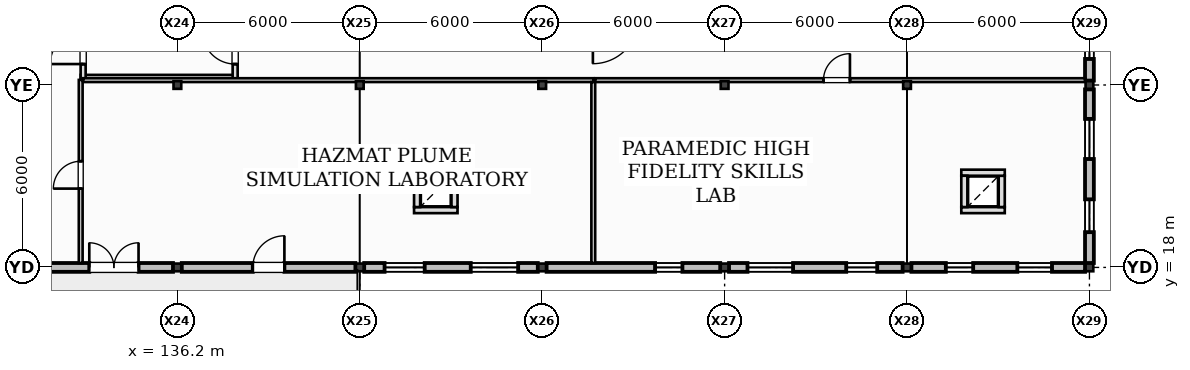
"""IFC4 building model, lengths in metres.
Left out: names, types, materials, properties, quantities, classifications, styles, units other than length and angle.
Written with IfcOpenShell. Run it as: python <this file> out.ifc"""

import sys

from ifc_helpers import new_model, si_unit, direction, frame, frame_2d, origin, origin_2d, place, context, subcontext, project, spatial, rectangle, i_section, extrude, element, fill, save


model = new_model("IFC4")
c1 = context("Model", 3, precision=1e-05, world=origin(), true_north=direction((0.0, 1.0)))
c2 = subcontext(c1, "Body", "Model", "MODEL_VIEW")
j1 = project(units=[si_unit("LENGTHUNIT", "METRE"), si_unit("PLANEANGLEUNIT", "RADIAN")], contexts=[c1])
p1 = place(None, origin())
s1 = spatial("IfcSite", under=j1, at=p1, CompositionType="ELEMENT")
p2 = place(p1, origin())
s2 = spatial("IfcBuilding", under=s1, at=p2, CompositionType="ELEMENT")
p3 = place(p2, frame((0.0, 0.0, 10.0)))
s3 = spatial("IfcBuildingStorey", under=s2, at=p3, CompositionType="ELEMENT", Elevation=10.0)
for number, where, z_axis, x_axis in (
    (1, (136.2, 18.0, 0.0), (0.0, 0.0, 1.0), (1.0, 0.0, 0.0)),
    (2, (136.2, 24.0, 0.0), (0.0, 0.0, 1.0), (1.0, 0.0, 0.0)),
    (3, (142.2, 18.0, 0.0), (0.0, 0.0, 1.0), (1.0, 0.0, 0.0)),
    (4, (142.2, 24.0, 0.0), (0.0, 0.0, 1.0), (1.0, 0.0, 0.0)),
    (5, (148.2, 18.0, 0.0), (0.0, 0.0, 1.0), (1.0, 0.0, 0.0)),
    (6, (148.2, 24.0, 0.0), (0.0, 0.0, 1.0), (1.0, 0.0, 0.0)),
    (7, (154.2, 18.0, 0.0), (0.0, 0.0, 1.0), (1.0, 0.0, 0.0)),
    (8, (154.2, 24.0, 0.0), (0.0, 0.0, 1.0), (1.0, 0.0, 0.0)),
    (9, (160.2, 18.0, 0.0), (0.0, 0.0, 1.0), (1.0, 0.0, 0.0)),
    (10, (160.2, 24.0, 0.0), (0.0, 0.0, 1.0), (1.0, 0.0, 0.0)),
    (11, (166.2, 18.0, 0.0), (0.0, 0.0, 1.0), (1.0, 0.0, 0.0)),
    (12, (166.2, 24.0, 0.0), (0.0, 0.0, 1.0), (1.0, 0.0, 0.0)),
):
    element("IfcColumn", number, at=place(p3, frame(where, z_axis=z_axis, x_axis=x_axis)), inside=s3, PredefinedType="COLUMN", context=c2, shape_type="SweptSolid", body=[
        extrude(i_section(OverallWidth=0.254, OverallDepth=0.253, WebThickness=0.009, FlangeThickness=0.014, at=origin_2d()), origin(), (0.0, 0.0, 1.0), 4.0),
    ])
p4 = place(p3, frame((130.345, 18.0, 0.0), z_axis=(0.0, 0.0, 1.0), x_axis=(1.0, 0.0, 0.0)))
e13 = element("IfcWall", 13, at=p4, inside=s3, PredefinedType="STANDARD", context=c2, shape_type="SweptSolid", body=[
    extrude(rectangle(XDim=5.71, YDim=0.29, at=frame_2d((2.855, 0.0))), origin(), (0.0, 0.0, 1.0), 4.0),
])
p5 = place(p4, frame((2.958, 0.0, 0.0)))
e14 = element("IfcOpeningElement", 14, at=p5, cuts=e13, PredefinedType="OPENING", context=c2, shape_type="SweptSolid", body=[
    extrude(rectangle(XDim=1.62, YDim=2.2, at=frame_2d((0.81, 1.1))), frame((0.0, 0.155, 0.0), z_axis=(0.0, -1.0, 0.0), x_axis=(1.0, 0.0, 0.0)), (0.0, 0.0, 1.0), 0.31),
])
p6 = place(p3, frame((136.345, 18.0, 0.0), z_axis=(0.0, 0.0, 1.0), x_axis=(1.0, 0.0, 0.0)))
e15 = element("IfcWall", 15, at=p6, inside=s3, PredefinedType="STANDARD", context=c2, shape_type="SweptSolid", body=[
    extrude(rectangle(XDim=5.71, YDim=0.29, at=frame_2d((2.855, 0.0))), origin(), (0.0, 0.0, 1.0), 4.0),
])
p7 = place(p6, frame((2.335, 0.0, 0.0)))
e16 = element("IfcOpeningElement", 16, at=p7, cuts=e15, PredefinedType="OPENING", context=c2, shape_type="SweptSolid", body=[
    extrude(rectangle(XDim=1.04, YDim=2.16, at=frame_2d((0.52, 1.08))), frame((0.0, 0.155, 0.0), z_axis=(0.0, -1.0, 0.0), x_axis=(1.0, 0.0, 0.0)), (0.0, 0.0, 1.0), 0.31),
])
p8 = place(p3, frame((142.345, 18.0, 0.0), z_axis=(0.0, 0.0, 1.0), x_axis=(1.0, 0.0, 0.0)))
e17 = element("IfcWall", 17, at=p8, inside=s3, PredefinedType="STANDARD", context=c2, shape_type="SweptSolid", body=[
    extrude(rectangle(XDim=5.71, YDim=0.29, at=frame_2d((2.855, 0.0))), origin(), (0.0, 0.0, 1.0), 4.0),
])
p9 = place(p8, frame((0.67, 0.0, 1.42)))
e18 = element("IfcOpeningElement", 18, at=p9, cuts=e17, PredefinedType="OPENING", context=c2, shape_type="SweptSolid", body=[
    extrude(rectangle(XDim=1.32, YDim=1.32, at=frame_2d((0.66, 0.66))), frame((0.0, 0.155, 0.0), z_axis=(0.0, -1.0, 0.0), x_axis=(1.0, 0.0, 0.0)), (0.0, 0.0, 1.0), 0.31),
])
p10 = place(p8, frame((3.504, 0.0, 1.28)))
e19 = element("IfcOpeningElement", 19, at=p10, cuts=e17, PredefinedType="OPENING", context=c2, shape_type="SweptSolid", body=[
    extrude(rectangle(XDim=1.56, YDim=1.56, at=frame_2d((0.78, 0.78))), frame((0.0, 0.155, 0.0), z_axis=(0.0, -1.0, 0.0), x_axis=(1.0, 0.0, 0.0)), (0.0, 0.0, 1.0), 0.31),
])
p11 = place(p3, frame((148.345, 18.0, 0.0), z_axis=(0.0, 0.0, 1.0), x_axis=(1.0, 0.0, 0.0)))
e20 = element("IfcWall", 20, at=p11, inside=s3, PredefinedType="STANDARD", context=c2, shape_type="SweptSolid", body=[
    extrude(rectangle(XDim=5.71, YDim=0.29, at=frame_2d((2.855, 0.0))), origin(), (0.0, 0.0, 1.0), 4.0),
])
p12 = place(p11, frame((3.567, 0.0, 0.86)))
e21 = element("IfcOpeningElement", 21, at=p12, cuts=e20, PredefinedType="OPENING", context=c2, shape_type="SweptSolid", body=[
    extrude(rectangle(XDim=0.9, YDim=0.9, at=frame_2d((0.45, 0.45))), frame((0.0, 0.155, 0.0), z_axis=(0.0, -1.0, 0.0), x_axis=(1.0, 0.0, 0.0)), (0.0, 0.0, 1.0), 0.31),
])
p13 = place(p3, frame((154.345, 18.0, 0.0), z_axis=(0.0, 0.0, 1.0), x_axis=(1.0, 0.0, 0.0)))
e22 = element("IfcWall", 22, at=p13, inside=s3, PredefinedType="STANDARD", context=c2, shape_type="SweptSolid", body=[
    extrude(rectangle(XDim=5.71, YDim=0.29, at=frame_2d((2.855, 0.0))), origin(), (0.0, 0.0, 1.0), 4.0),
])
p14 = place(p13, frame((0.607, 0.0, 1.28)))
e23 = element("IfcOpeningElement", 23, at=p14, cuts=e22, PredefinedType="OPENING", context=c2, shape_type="SweptSolid", body=[
    extrude(rectangle(XDim=1.5, YDim=1.5, at=frame_2d((0.75, 0.75))), frame((0.0, 0.155, 0.0), z_axis=(0.0, -1.0, 0.0), x_axis=(1.0, 0.0, 0.0)), (0.0, 0.0, 1.0), 0.31),
])
p15 = place(p13, frame((3.855, 0.0, 1.18)))
e24 = element("IfcOpeningElement", 24, at=p15, cuts=e22, PredefinedType="OPENING", context=c2, shape_type="SweptSolid", body=[
    extrude(rectangle(XDim=1.02, YDim=1.02, at=frame_2d((0.51, 0.51))), frame((0.0, 0.155, 0.0), z_axis=(0.0, -1.0, 0.0), x_axis=(1.0, 0.0, 0.0)), (0.0, 0.0, 1.0), 0.31),
])
p16 = place(p3, frame((160.345, 18.0, 0.0), z_axis=(0.0, 0.0, 1.0), x_axis=(1.0, 0.0, 0.0)))
e25 = element("IfcWall", 25, at=p16, inside=s3, PredefinedType="STANDARD", context=c2, shape_type="SweptSolid", body=[
    extrude(rectangle(XDim=5.71, YDim=0.29, at=frame_2d((2.855, 0.0))), origin(), (0.0, 0.0, 1.0), 4.0),
])
p17 = place(p16, frame((1.131, 0.0, 0.86)))
e26 = element("IfcOpeningElement", 26, at=p17, cuts=e25, PredefinedType="OPENING", context=c2, shape_type="SweptSolid", body=[
    extrude(rectangle(XDim=0.9, YDim=0.9, at=frame_2d((0.45, 0.45))), frame((0.0, 0.155, 0.0), z_axis=(0.0, -1.0, 0.0), x_axis=(1.0, 0.0, 0.0)), (0.0, 0.0, 1.0), 0.31),
])
p18 = place(p16, frame((3.483, 0.0, 1.42)))
e27 = element("IfcOpeningElement", 27, at=p18, cuts=e25, PredefinedType="OPENING", context=c2, shape_type="SweptSolid", body=[
    extrude(rectangle(XDim=1.14, YDim=1.14, at=frame_2d((0.57, 0.57))), frame((0.0, 0.155, 0.0), z_axis=(0.0, -1.0, 0.0), x_axis=(1.0, 0.0, 0.0)), (0.0, 0.0, 1.0), 0.31),
])
p19 = place(p3, frame((166.2, 18.145, 0.0), z_axis=(0.0, 0.0, 1.0), x_axis=(0.0, 1.0, 0.0)))
e28 = element("IfcWall", 28, at=p19, inside=s3, PredefinedType="STANDARD", context=c2, shape_type="SweptSolid", body=[
    extrude(rectangle(XDim=5.71, YDim=0.29, at=frame_2d((2.855, 0.0))), origin(), (0.0, 0.0, 1.0), 3.463),
])
p20 = place(p19, frame((1.014, 0.0, 0.86)))
e29 = element("IfcOpeningElement", 29, at=p20, cuts=e28, PredefinedType="OPENING", context=c2, shape_type="SweptSolid", body=[
    extrude(rectangle(XDim=1.08, YDim=1.08, at=frame_2d((0.54, 0.54))), frame((0.0, 0.155, 0.0), z_axis=(0.0, -1.0, 0.0), x_axis=(1.0, 0.0, 0.0)), (0.0, 0.0, 1.0), 0.31),
])
p21 = place(p19, frame((3.42, 0.0, 1.42)))
e30 = element("IfcOpeningElement", 30, at=p21, cuts=e28, PredefinedType="OPENING", context=c2, shape_type="SweptSolid", body=[
    extrude(rectangle(XDim=1.32, YDim=1.32, at=frame_2d((0.66, 0.66))), frame((0.0, 0.155, 0.0), z_axis=(0.0, -1.0, 0.0), x_axis=(1.0, 0.0, 0.0)), (0.0, 0.0, 1.0), 0.31),
])
p22 = place(p3, frame((166.2, 24.145, 0.0), z_axis=(0.0, 0.0, 1.0), x_axis=(0.0, 1.0, 0.0)))
e31 = element("IfcWall", 31, at=p22, inside=s3, PredefinedType="STANDARD", context=c2, shape_type="SweptSolid", body=[
    extrude(rectangle(XDim=5.71, YDim=0.29, at=frame_2d((2.855, 0.0))), origin(), (0.0, 0.0, 1.0), 3.463),
])
p23 = place(p22, frame((0.712, 0.0, 1.18)))
e32 = element("IfcOpeningElement", 32, at=p23, cuts=e31, PredefinedType="OPENING", context=c2, shape_type="SweptSolid", body=[
    extrude(rectangle(XDim=1.2, YDim=1.2, at=frame_2d((0.6, 0.6))), frame((0.0, 0.155, 0.0), z_axis=(0.0, -1.0, 0.0), x_axis=(1.0, 0.0, 0.0)), (0.0, 0.0, 1.0), 0.31),
])
p24 = place(p22, frame((3.582, 0.0, 0.96)))
e33 = element("IfcOpeningElement", 33, at=p24, cuts=e31, PredefinedType="OPENING", context=c2, shape_type="SweptSolid", body=[
    extrude(rectangle(XDim=1.44, YDim=1.44, at=frame_2d((0.72, 0.72))), frame((0.0, 0.155, 0.0), z_axis=(0.0, -1.0, 0.0), x_axis=(1.0, 0.0, 0.0)), (0.0, 0.0, 1.0), 0.31),
])
p25 = place(p3, frame((133.02, 24.25, 0.0), z_axis=(0.0, 0.0, 1.0), x_axis=(1.0, 0.0, 0.0)))
e34 = element("IfcWall", 34, at=p25, inside=s3, PredefinedType="PARTITIONING", context=c2, shape_type="SweptSolid", body=[
    extrude(rectangle(XDim=5.16, YDim=0.165, at=frame_2d((2.58, 0.0))), origin(), (0.0, 0.0, 1.0), 3.74),
])
p26 = place(p3, frame((133.1, 24.17, 0.0), z_axis=(0.0, 0.0, 1.0), x_axis=(0.0, 1.0, 0.0)))
e35 = element("IfcWall", 35, at=p26, inside=s3, PredefinedType="PARTITIONING", context=c2, shape_type="SweptSolid", body=[
    extrude(rectangle(XDim=2.118, YDim=0.165, at=frame_2d((1.059, 0.0))), origin(), (0.0, 0.0, 1.0), 3.74),
])
p27 = place(p26, frame((0.519, 0.0, 0.0)))
e36 = element("IfcOpeningElement", 36, at=p27, cuts=e35, PredefinedType="OPENING", context=c2, shape_type="SweptSolid", body=[
    extrude(rectangle(XDim=1.08, YDim=2.14, at=frame_2d((0.54, 1.07))), frame((0.0, 0.093, 0.0), z_axis=(0.0, -1.0, 0.0), x_axis=(1.0, 0.0, 0.0)), (0.0, 0.0, 1.0), 0.185),
])
p28 = place(p3, frame((138.1, 24.17, 0.0), z_axis=(0.0, 0.0, 1.0), x_axis=(0.0, 1.0, 0.0)))
e37 = element("IfcWall", 37, at=p28, inside=s3, PredefinedType="PARTITIONING", context=c2, shape_type="SweptSolid", body=[
    extrude(rectangle(XDim=2.118, YDim=0.165, at=frame_2d((1.059, 0.0))), origin(), (0.0, 0.0, 1.0), 3.74),
])
p29 = place(p28, frame((0.519, 0.0, 0.0)))
e38 = element("IfcOpeningElement", 38, at=p29, cuts=e37, PredefinedType="OPENING", context=c2, shape_type="SweptSolid", body=[
    extrude(rectangle(XDim=1.08, YDim=2.14, at=frame_2d((0.54, 1.07))), frame((0.0, 0.093, 0.0), z_axis=(0.0, -1.0, 0.0), x_axis=(1.0, 0.0, 0.0)), (0.0, 0.0, 1.0), 0.185),
])
p30 = place(p3, frame((143.985, 19.885, 0.0), z_axis=(0.0, 0.0, 1.0), x_axis=(1.0, 0.0, 0.0)))
e39 = element("IfcWall", 39, at=p30, inside=s3, PredefinedType="PARTITIONING", context=c2, shape_type="SweptSolid", body=[
    extrude(rectangle(XDim=1.43, YDim=0.2, at=frame_2d((0.715, 0.0))), origin(), (0.0, 0.0, 1.0), 3.74),
])
p31 = place(p3, frame((145.315, 19.985, 0.0), z_axis=(0.0, 0.0, 1.0), x_axis=(0.0, 1.0, 0.0)))
e40 = element("IfcWall", 40, at=p31, inside=s3, PredefinedType="PARTITIONING", context=c2, shape_type="SweptSolid", body=[
    extrude(rectangle(XDim=1.03, YDim=0.2, at=frame_2d((0.515, 0.0))), origin(), (0.0, 0.0, 1.0), 3.74),
])
p32 = place(p3, frame((145.415, 21.115, 0.0), z_axis=(0.0, 0.0, 1.0), x_axis=(-1.0, 0.0, 0.0)))
e41 = element("IfcWall", 41, at=p32, inside=s3, PredefinedType="PARTITIONING", context=c2, shape_type="SweptSolid", body=[
    extrude(rectangle(XDim=1.43, YDim=0.2, at=frame_2d((0.715, 0.0))), origin(), (0.0, 0.0, 1.0), 3.74),
])
p33 = place(p3, frame((144.085, 21.015, 0.0), z_axis=(0.0, 0.0, 1.0), x_axis=(0.0, -1.0, 0.0)))
e42 = element("IfcWall", 42, at=p33, inside=s3, PredefinedType="PARTITIONING", context=c2, shape_type="SweptSolid", body=[
    extrude(rectangle(XDim=1.03, YDim=0.2, at=frame_2d((0.515, 0.0))), origin(), (0.0, 0.0, 1.0), 3.74),
])
p34 = place(p3, frame((161.985, 19.885, 0.0), z_axis=(0.0, 0.0, 1.0), x_axis=(1.0, 0.0, 0.0)))
e43 = element("IfcWall", 43, at=p34, inside=s3, PredefinedType="PARTITIONING", context=c2, shape_type="SweptSolid", body=[
    extrude(rectangle(XDim=1.43, YDim=0.2, at=frame_2d((0.715, 0.0))), origin(), (0.0, 0.0, 1.0), 3.74),
])
p35 = place(p3, frame((163.315, 19.985, 0.0), z_axis=(0.0, 0.0, 1.0), x_axis=(0.0, 1.0, 0.0)))
e44 = element("IfcWall", 44, at=p35, inside=s3, PredefinedType="PARTITIONING", context=c2, shape_type="SweptSolid", body=[
    extrude(rectangle(XDim=1.03, YDim=0.2, at=frame_2d((0.515, 0.0))), origin(), (0.0, 0.0, 1.0), 3.74),
])
p36 = place(p3, frame((163.415, 21.115, 0.0), z_axis=(0.0, 0.0, 1.0), x_axis=(-1.0, 0.0, 0.0)))
e45 = element("IfcWall", 45, at=p36, inside=s3, PredefinedType="PARTITIONING", context=c2, shape_type="SweptSolid", body=[
    extrude(rectangle(XDim=1.43, YDim=0.2, at=frame_2d((0.715, 0.0))), origin(), (0.0, 0.0, 1.0), 3.74),
])
p37 = place(p3, frame((162.085, 21.015, 0.0), z_axis=(0.0, 0.0, 1.0), x_axis=(0.0, -1.0, 0.0)))
e46 = element("IfcWall", 46, at=p37, inside=s3, PredefinedType="PARTITIONING", context=c2, shape_type="SweptSolid", body=[
    extrude(rectangle(XDim=1.03, YDim=0.2, at=frame_2d((0.515, 0.0))), origin(), (0.0, 0.0, 1.0), 3.74),
])
p38 = place(p3, frame((133.02, 18.145, 0.0), z_axis=(0.0, 0.0, 1.0), x_axis=(0.0, 1.0, 0.0)))
e47 = element("IfcWall", 47, at=p38, inside=s3, PredefinedType="PARTITIONING", context=c2, shape_type="SweptSolid", body=[
    extrude(rectangle(XDim=6.022, YDim=0.125, at=frame_2d((3.011, 0.0))), origin(), (0.0, 0.0, 1.0), 3.74),
])
p39 = place(p38, frame((2.447, 0.0, 0.0)))
e48 = element("IfcOpeningElement", 48, at=p39, cuts=e47, PredefinedType="OPENING", context=c2, shape_type="SweptSolid", body=[
    extrude(rectangle(XDim=0.9, YDim=2.1, at=frame_2d((0.45, 1.05))), frame((0.0, 0.073, 0.0), z_axis=(0.0, -1.0, 0.0), x_axis=(1.0, 0.0, 0.0)), (0.0, 0.0, 1.0), 0.145),
])
p40 = place(p3, frame((133.1, 24.16, 0.0), z_axis=(0.0, 0.0, 1.0), x_axis=(1.0, 0.0, 0.0)))
e49 = element("IfcWall", 49, at=p40, inside=s3, PredefinedType="PARTITIONING", context=c2, shape_type="SweptSolid", body=[
    extrude(rectangle(XDim=16.782, YDim=0.125, at=frame_2d((8.391, 0.0))), origin(), (0.0, 0.0, 1.0), 3.74),
])
p41 = place(p3, frame((149.88, 24.097, 0.0), z_axis=(0.0, 0.0, 1.0), x_axis=(0.0, -1.0, 0.0)))
e50 = element("IfcWall", 50, at=p41, inside=s3, PredefinedType="PARTITIONING", context=c2, shape_type="SweptSolid", body=[
    extrude(rectangle(XDim=5.952, YDim=0.125, at=frame_2d((2.976, 0.0))), origin(), (0.0, 0.0, 1.0), 3.74),
])
p42 = place(p3, frame((149.942, 24.16, 0.0), z_axis=(0.0, 0.0, 1.0), x_axis=(1.0, 0.0, 0.0)))
e51 = element("IfcWall", 51, at=p42, inside=s3, PredefinedType="PARTITIONING", context=c2, shape_type="SweptSolid", body=[
    extrude(rectangle(XDim=16.113, YDim=0.125, at=frame_2d((8.056, 0.0))), origin(), (0.0, 0.0, 1.0), 3.74),
])
p43 = place(p42, frame((7.51, 0.0, 0.0)))
e52 = element("IfcOpeningElement", 52, at=p43, cuts=e51, PredefinedType="OPENING", context=c2, shape_type="SweptSolid", body=[
    extrude(rectangle(XDim=0.87, YDim=2.06, at=frame_2d((0.435, 1.03))), frame((0.0, 0.073, 0.0), z_axis=(0.0, -1.0, 0.0), x_axis=(1.0, 0.0, 0.0)), (0.0, 0.0, 1.0), 0.145),
])
p44 = place(p5, frame((1.62, 0.0, 0.0), z_axis=(0.0, 0.0, 1.0), x_axis=(-1.0, 0.0, 0.0)))
e53 = element("IfcDoor", 53, at=p44, inside=s3, OperationType="DOUBLE_DOOR_SINGLE_SWING", PredefinedType="DOOR", context=c2, shape_type="SweptSolid", body=[
    extrude(rectangle(XDim=1.62, YDim=2.2, at=frame_2d((0.81, 1.1))), frame((0.0, 0.025, 0.0), z_axis=(0.0, -1.0, 0.0), x_axis=(1.0, 0.0, 0.0)), (0.0, 0.0, 1.0), 0.05),
])
fill(e14, e53)
p45 = place(p7, frame((1.04, 0.0, 0.0), z_axis=(0.0, 0.0, 1.0), x_axis=(-1.0, 0.0, 0.0)))
e54 = element("IfcDoor", 54, at=p45, inside=s3, OperationType="SINGLE_SWING_RIGHT", PredefinedType="DOOR", context=c2, shape_type="SweptSolid", body=[
    extrude(rectangle(XDim=1.04, YDim=2.16, at=frame_2d((0.52, 1.08))), frame((0.0, 0.025, 0.0), z_axis=(0.0, -1.0, 0.0), x_axis=(1.0, 0.0, 0.0)), (0.0, 0.0, 1.0), 0.05),
])
fill(e16, e54)
p46 = place(p9, origin())
e55 = element("IfcWindow", 55, at=p46, inside=s3, PartitioningType="SINGLE_PANEL", PredefinedType="WINDOW", context=c2, shape_type="SweptSolid", body=[
    extrude(rectangle(XDim=1.32, YDim=1.32, at=frame_2d((0.66, 0.66))), frame((0.0, 0.03, 0.0), z_axis=(0.0, -1.0, 0.0), x_axis=(1.0, 0.0, 0.0)), (0.0, 0.0, 1.0), 0.06),
])
fill(e18, e55)
p47 = place(p10, origin())
e56 = element("IfcWindow", 56, at=p47, inside=s3, PartitioningType="SINGLE_PANEL", PredefinedType="WINDOW", context=c2, shape_type="SweptSolid", body=[
    extrude(rectangle(XDim=1.56, YDim=1.56, at=frame_2d((0.78, 0.78))), frame((0.0, 0.03, 0.0), z_axis=(0.0, -1.0, 0.0), x_axis=(1.0, 0.0, 0.0)), (0.0, 0.0, 1.0), 0.06),
])
fill(e19, e56)
p48 = place(p12, origin())
e57 = element("IfcWindow", 57, at=p48, inside=s3, PartitioningType="SINGLE_PANEL", PredefinedType="WINDOW", context=c2, shape_type="SweptSolid", body=[
    extrude(rectangle(XDim=0.9, YDim=0.9, at=frame_2d((0.45, 0.45))), frame((0.0, 0.03, 0.0), z_axis=(0.0, -1.0, 0.0), x_axis=(1.0, 0.0, 0.0)), (0.0, 0.0, 1.0), 0.06),
])
fill(e21, e57)
p49 = place(p14, origin())
e58 = element("IfcWindow", 58, at=p49, inside=s3, PartitioningType="SINGLE_PANEL", PredefinedType="WINDOW", context=c2, shape_type="SweptSolid", body=[
    extrude(rectangle(XDim=1.5, YDim=1.5, at=frame_2d((0.75, 0.75))), frame((0.0, 0.03, 0.0), z_axis=(0.0, -1.0, 0.0), x_axis=(1.0, 0.0, 0.0)), (0.0, 0.0, 1.0), 0.06),
])
fill(e23, e58)
p50 = place(p15, origin())
e59 = element("IfcWindow", 59, at=p50, inside=s3, PartitioningType="SINGLE_PANEL", PredefinedType="WINDOW", context=c2, shape_type="SweptSolid", body=[
    extrude(rectangle(XDim=1.02, YDim=1.02, at=frame_2d((0.51, 0.51))), frame((0.0, 0.03, 0.0), z_axis=(0.0, -1.0, 0.0), x_axis=(1.0, 0.0, 0.0)), (0.0, 0.0, 1.0), 0.06),
])
fill(e24, e59)
p51 = place(p17, origin())
e60 = element("IfcWindow", 60, at=p51, inside=s3, PartitioningType="SINGLE_PANEL", PredefinedType="WINDOW", context=c2, shape_type="SweptSolid", body=[
    extrude(rectangle(XDim=0.9, YDim=0.9, at=frame_2d((0.45, 0.45))), frame((0.0, 0.03, 0.0), z_axis=(0.0, -1.0, 0.0), x_axis=(1.0, 0.0, 0.0)), (0.0, 0.0, 1.0), 0.06),
])
fill(e26, e60)
p52 = place(p18, origin())
e61 = element("IfcWindow", 61, at=p52, inside=s3, PartitioningType="SINGLE_PANEL", PredefinedType="WINDOW", context=c2, shape_type="SweptSolid", body=[
    extrude(rectangle(XDim=1.14, YDim=1.14, at=frame_2d((0.57, 0.57))), frame((0.0, 0.03, 0.0), z_axis=(0.0, -1.0, 0.0), x_axis=(1.0, 0.0, 0.0)), (0.0, 0.0, 1.0), 0.06),
])
fill(e27, e61)
p53 = place(p20, origin())
e62 = element("IfcWindow", 62, at=p53, inside=s3, PartitioningType="SINGLE_PANEL", PredefinedType="WINDOW", context=c2, shape_type="SweptSolid", body=[
    extrude(rectangle(XDim=1.08, YDim=1.08, at=frame_2d((0.54, 0.54))), frame((0.0, 0.03, 0.0), z_axis=(0.0, -1.0, 0.0), x_axis=(1.0, 0.0, 0.0)), (0.0, 0.0, 1.0), 0.06),
])
fill(e29, e62)
p54 = place(p21, origin())
e63 = element("IfcWindow", 63, at=p54, inside=s3, PartitioningType="SINGLE_PANEL", PredefinedType="WINDOW", context=c2, shape_type="SweptSolid", body=[
    extrude(rectangle(XDim=1.32, YDim=1.32, at=frame_2d((0.66, 0.66))), frame((0.0, 0.03, 0.0), z_axis=(0.0, -1.0, 0.0), x_axis=(1.0, 0.0, 0.0)), (0.0, 0.0, 1.0), 0.06),
])
fill(e30, e63)
p55 = place(p23, origin())
e64 = element("IfcWindow", 64, at=p55, inside=s3, PartitioningType="SINGLE_PANEL", PredefinedType="WINDOW", context=c2, shape_type="SweptSolid", body=[
    extrude(rectangle(XDim=1.2, YDim=1.2, at=frame_2d((0.6, 0.6))), frame((0.0, 0.03, 0.0), z_axis=(0.0, -1.0, 0.0), x_axis=(1.0, 0.0, 0.0)), (0.0, 0.0, 1.0), 0.06),
])
fill(e32, e64)
p56 = place(p27, frame((1.08, 0.0, 0.0), z_axis=(0.0, 0.0, 1.0), x_axis=(-1.0, 0.0, 0.0)))
e65 = element("IfcDoor", 65, at=p56, inside=s3, OperationType="SINGLE_SWING_LEFT", PredefinedType="DOOR", context=c2, shape_type="SweptSolid", body=[
    extrude(rectangle(XDim=1.08, YDim=2.14, at=frame_2d((0.54, 1.07))), frame((0.0, 0.025, 0.0), z_axis=(0.0, -1.0, 0.0), x_axis=(1.0, 0.0, 0.0)), (0.0, 0.0, 1.0), 0.05),
])
fill(e36, e65)
p57 = place(p29, origin())
e66 = element("IfcDoor", 66, at=p57, inside=s3, OperationType="SINGLE_SWING_RIGHT", PredefinedType="DOOR", context=c2, shape_type="SweptSolid", body=[
    extrude(rectangle(XDim=1.08, YDim=2.14, at=frame_2d((0.54, 1.07))), frame((0.0, 0.025, 0.0), z_axis=(0.0, -1.0, 0.0), x_axis=(1.0, 0.0, 0.0)), (0.0, 0.0, 1.0), 0.05),
])
fill(e38, e66)
p58 = place(p39, frame((0.9, 0.0, 0.0), z_axis=(0.0, 0.0, 1.0), x_axis=(-1.0, 0.0, 0.0)))
e67 = element("IfcDoor", 67, at=p58, inside=s3, OperationType="SINGLE_SWING_LEFT", PredefinedType="DOOR", context=c2, shape_type="SweptSolid", body=[
    extrude(rectangle(XDim=0.9, YDim=2.1, at=frame_2d((0.45, 1.05))), frame((0.0, 0.025, 0.0), z_axis=(0.0, -1.0, 0.0), x_axis=(1.0, 0.0, 0.0)), (0.0, 0.0, 1.0), 0.05),
])
fill(e48, e67)
p59 = place(p43, frame((0.87, 0.0, 0.0), z_axis=(0.0, 0.0, 1.0), x_axis=(-1.0, 0.0, 0.0)))
e68 = element("IfcDoor", 68, at=p59, inside=s3, OperationType="SINGLE_SWING_RIGHT", PredefinedType="DOOR", context=c2, shape_type="SweptSolid", body=[
    extrude(rectangle(XDim=0.87, YDim=2.06, at=frame_2d((0.435, 1.03))), frame((0.0, 0.025, 0.0), z_axis=(0.0, -1.0, 0.0), x_axis=(1.0, 0.0, 0.0)), (0.0, 0.0, 1.0), 0.05),
])
fill(e52, e68)
save(model, sys.argv[1])
